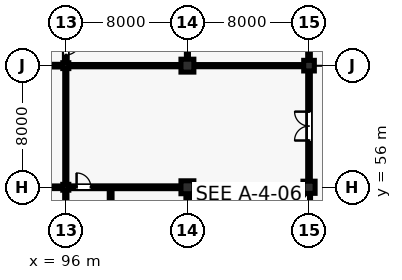
"""IFC4 building model, lengths in metres.
Left out: names, types, materials, properties, quantities, classifications, styles, units other than length and angle.
Written with IfcOpenShell. Run it as: python <this file> out.ifc"""

import sys

from ifc_helpers import new_model, si_unit, direction, frame, frame_2d, origin, origin_2d, place, context, subcontext, project, spatial, rectangle, i_section, extrude, element, fill, save


model = new_model("IFC4")
c1 = context("Model", 3, precision=1e-05, world=origin(), true_north=direction((0.0, 1.0)))
c2 = subcontext(c1, "Body", "Model", "MODEL_VIEW")
j1 = project(units=[si_unit("LENGTHUNIT", "METRE"), si_unit("PLANEANGLEUNIT", "RADIAN")], contexts=[c1])
p1 = place(None, origin())
s1 = spatial("IfcSite", under=j1, at=p1, CompositionType="ELEMENT")
p2 = place(p1, origin())
s2 = spatial("IfcBuilding", under=s1, at=p2, CompositionType="ELEMENT")
p3 = place(p2, origin())
s3 = spatial("IfcBuildingStorey", under=s2, at=p3, CompositionType="ELEMENT", Elevation=0.0)
for number, where, z_axis, x_axis in (
    (1, (96.0, 56.0, 0.0), (0.0, 0.0, 1.0), (1.0, 0.0, 0.0)),
    (2, (96.0, 64.0, 0.0), (0.0, 0.0, 1.0), (1.0, 0.0, 0.0)),
):
    element("IfcColumn", number, at=place(p3, frame(where, z_axis=z_axis, x_axis=x_axis)), inside=s3, PredefinedType="COLUMN", context=c2, shape_type="SweptSolid", body=[
        extrude(i_section(OverallWidth=0.398, OverallDepth=0.387, WebThickness=0.021, FlangeThickness=0.033, FilletRadius=0.015, at=origin_2d()), origin(), (0.0, 0.0, 1.0), 5.28),
    ])
for number, where, z_axis, x_axis in (
    (3, (104.0, 56.0, 0.0), (0.0, 0.0, 1.0), (1.0, 0.0, 0.0)),
    (4, (104.0, 64.0, 0.0), (0.0, 0.0, 1.0), (1.0, 0.0, 0.0)),
):
    element("IfcColumn", number, at=place(p3, frame(where, z_axis=z_axis, x_axis=x_axis)), inside=s3, PredefinedType="COLUMN", context=c2, shape_type="SweptSolid", body=[
        extrude(rectangle(XDim=0.85, YDim=0.85, at=origin_2d()), origin(), (0.0, 0.0, 1.0), 5.28),
    ])
p4 = place(p3, frame((112.0, 56.0, 0.0), z_axis=(0.0, 0.0, 1.0), x_axis=(1.0, 0.0, 0.0)))
e5 = element("IfcColumn", 5, at=p4, inside=s3, PredefinedType="COLUMN", context=c2, shape_type="SweptSolid", body=[
    extrude(rectangle(XDim=0.8, YDim=0.8, at=origin_2d()), origin(), (0.0, 0.0, 1.0), 5.28),
])
p5 = place(p3, frame((112.0, 64.0, 0.0), z_axis=(0.0, 0.0, 1.0), x_axis=(1.0, 0.0, 0.0)))
e6 = element("IfcColumn", 6, at=p5, inside=s3, PredefinedType="COLUMN", context=c2, shape_type="SweptSolid", body=[
    extrude(rectangle(XDim=0.7, YDim=0.7, at=origin_2d()), origin(), (0.0, 0.0, 1.0), 5.28),
])
p6 = place(p3, frame((104.05, 48.315, 0.0), z_axis=(0.0, 0.0, 1.0), x_axis=(0.0, 1.0, 0.0)))
e7 = element("IfcWall", 7, at=p6, inside=s3, PredefinedType="SHEAR", context=c2, shape_type="SweptSolid", body=[
    extrude(rectangle(XDim=7.37, YDim=0.3, at=frame_2d((3.685, 0.0))), origin(), (0.0, 0.0, 1.0), 5.035),
])
p7 = place(p3, frame((104.315, 55.95, 0.0), z_axis=(0.0, 0.0, 1.0), x_axis=(1.0, 0.0, 0.0)))
e8 = element("IfcWall", 8, at=p7, inside=s3, PredefinedType="SHEAR", context=c2, shape_type="SweptSolid", body=[
    extrude(rectangle(XDim=7.395, YDim=0.3, at=frame_2d((3.698, 0.0))), origin(), (0.0, 0.0, 1.0), 5.035),
])
p8 = place(p3, frame((111.95, 48.29, 0.0), z_axis=(0.0, 0.0, 1.0), x_axis=(0.0, 1.0, 0.0)))
e9 = element("IfcWall", 9, at=p8, inside=s3, PredefinedType="SHEAR", context=c2, shape_type="SweptSolid", body=[
    extrude(rectangle(XDim=7.42, YDim=0.3, at=frame_2d((3.71, 0.0))), origin(), (0.0, 0.0, 1.0), 5.035),
])
p9 = place(p3, frame((108.0, 48.05, 0.0), z_axis=(0.0, 0.0, 1.0), x_axis=(0.0, 1.0, 0.0)))
e10 = element("IfcWall", 10, at=p9, inside=s3, PredefinedType="SHEAR", context=c2, shape_type="SweptSolid", body=[
    extrude(rectangle(XDim=7.9, YDim=0.3, at=frame_2d((3.95, 0.0))), origin(), (0.0, 0.0, 1.0), 5.035),
])
p10 = place(p9, frame((0.55, 0.0, 0.0)))
e11 = element("IfcOpeningElement", 11, at=p10, cuts=e10, PredefinedType="OPENING", context=c2, shape_type="SweptSolid", body=[
    extrude(rectangle(XDim=1.1, YDim=2.15, at=frame_2d((0.55, 1.075))), frame((0.0, 0.16, 0.0), z_axis=(0.0, -1.0, 0.0), x_axis=(1.0, 0.0, 0.0)), (0.0, 0.0, 1.0), 0.32),
])
p11 = place(p3, frame((109.98, 53.05, 0.0), z_axis=(0.0, 0.0, 1.0), x_axis=(0.0, 1.0, 0.0)))
e12 = element("IfcWall", 12, at=p11, inside=s3, PredefinedType="SHEAR", context=c2, shape_type="SweptSolid", body=[
    extrude(rectangle(XDim=2.9, YDim=0.3, at=frame_2d((1.45, 0.0))), origin(), (0.0, 0.0, 1.0), 5.035),
])
p12 = place(p3, frame((96.0, 50.95, 0.0), z_axis=(0.0, 0.0, 1.0), x_axis=(0.0, 1.0, 0.0)))
e13 = element("IfcWall", 13, at=p12, inside=s3, PredefinedType="PARTITIONING", context=c2, shape_type="SweptSolid", body=[
    extrude(rectangle(XDim=4.846, YDim=0.15, at=frame_2d((2.423, 0.0))), origin(), (0.0, 0.0, 1.0), 4.404),
])
p13 = place(p3, frame((98.95, 50.9, 0.0), z_axis=(0.0, 0.0, 1.0), x_axis=(0.0, 1.0, 0.0)))
e14 = element("IfcWall", 14, at=p13, inside=s3, PredefinedType="PARTITIONING", context=c2, shape_type="SweptSolid", body=[
    extrude(rectangle(XDim=5.08, YDim=0.185, at=frame_2d((2.54, 0.0))), origin(), (0.0, 0.0, 1.0), 4.404),
])
p14 = place(p3, frame((88.0, 56.0, 0.0), z_axis=(0.0, 0.0, 1.0), x_axis=(1.0, 0.0, 0.0)))
e15 = element("IfcWall", 15, at=p14, inside=s3, PredefinedType="PARTITIONING", context=c2, shape_type="SweptSolid", body=[
    extrude(rectangle(XDim=7.811, YDim=0.175, at=frame_2d((3.906, 0.0))), origin(), (0.0, 0.0, 1.0), 4.169),
])
p15 = place(p14, frame((0.52, 0.0, 0.0)))
e16 = element("IfcOpeningElement", 16, at=p15, cuts=e15, PredefinedType="OPENING", context=c2, shape_type="SweptSolid", body=[
    extrude(rectangle(XDim=0.94, YDim=2.12, at=frame_2d((0.47, 1.06))), frame((0.0, 0.097, 0.0), z_axis=(0.0, -1.0, 0.0), x_axis=(1.0, 0.0, 0.0)), (0.0, 0.0, 1.0), 0.195),
])
p16 = place(p3, frame((96.0, 56.184, 0.0), z_axis=(0.0, 0.0, 1.0), x_axis=(0.0, 1.0, 0.0)))
e17 = element("IfcWall", 17, at=p16, inside=s3, PredefinedType="PARTITIONING", context=c2, shape_type="SweptSolid", body=[
    extrude(rectangle(XDim=7.633, YDim=0.142, at=frame_2d((3.816, 0.0))), origin(), (0.0, 0.0, 1.0), 4.471),
])
p17 = place(p3, frame((88.0, 64.0, 0.0), z_axis=(0.0, 0.0, 1.0), x_axis=(1.0, 0.0, 0.0)))
e18 = element("IfcWall", 18, at=p17, inside=s3, PredefinedType="PARTITIONING", context=c2, shape_type="SweptSolid", body=[
    extrude(rectangle(XDim=7.811, YDim=0.175, at=frame_2d((3.906, 0.0))), origin(), (0.0, 0.0, 1.0), 4.25),
])
p18 = place(p17, frame((2.956, 0.0, 0.0)))
e19 = element("IfcOpeningElement", 19, at=p18, cuts=e18, PredefinedType="OPENING", context=c2, shape_type="SweptSolid", body=[
    extrude(rectangle(XDim=1.9, YDim=2.38, at=frame_2d((0.95, 1.19))), frame((0.0, 0.097, 0.0), z_axis=(0.0, -1.0, 0.0), x_axis=(1.0, 0.0, 0.0)), (0.0, 0.0, 1.0), 0.195),
])
p19 = place(p3, frame((96.0, 64.184, 0.0), z_axis=(0.0, 0.0, 1.0), x_axis=(0.0, 1.0, 0.0)))
e20 = element("IfcWall", 20, at=p19, inside=s3, PredefinedType="PARTITIONING", context=c2, shape_type="SweptSolid", body=[
    extrude(rectangle(XDim=7.633, YDim=0.185, at=frame_2d((3.816, 0.0))), origin(), (0.0, 0.0, 1.0), 4.403),
])
p20 = place(p19, frame((0.52, 0.0, 0.0)))
e21 = element("IfcOpeningElement", 21, at=p20, cuts=e20, PredefinedType="OPENING", context=c2, shape_type="SweptSolid", body=[
    extrude(rectangle(XDim=0.94, YDim=2.12, at=frame_2d((0.47, 1.06))), frame((0.0, 0.103, 0.0), z_axis=(0.0, -1.0, 0.0), x_axis=(1.0, 0.0, 0.0)), (0.0, 0.0, 1.0), 0.205),
])
p21 = place(p3, frame((96.189, 56.0, 0.0), z_axis=(0.0, 0.0, 1.0), x_axis=(1.0, 0.0, 0.0)))
e22 = element("IfcWall", 22, at=p21, inside=s3, PredefinedType="PARTITIONING", context=c2, shape_type="SweptSolid", body=[
    extrude(rectangle(XDim=7.396, YDim=0.185, at=frame_2d((3.698, 0.0))), origin(), (0.0, 0.0, 1.0), 4.404),
])
p22 = place(p21, frame((0.52, 0.0, 0.0)))
e23 = element("IfcOpeningElement", 23, at=p22, cuts=e22, PredefinedType="OPENING", context=c2, shape_type="SweptSolid", body=[
    extrude(rectangle(XDim=0.94, YDim=2.12, at=frame_2d((0.47, 1.06))), frame((0.0, 0.103, 0.0), z_axis=(0.0, -1.0, 0.0), x_axis=(1.0, 0.0, 0.0)), (0.0, 0.0, 1.0), 0.205),
])
p23 = place(p3, frame((96.189, 64.0, 0.0), z_axis=(0.0, 0.0, 1.0), x_axis=(1.0, 0.0, 0.0)))
e24 = element("IfcWall", 24, at=p23, inside=s3, PredefinedType="PARTITIONING", context=c2, shape_type="SweptSolid", body=[
    extrude(rectangle(XDim=7.396, YDim=0.15, at=frame_2d((3.698, 0.0))), origin(), (0.0, 0.0, 1.0), 4.327),
])
p24 = place(p3, frame((104.0, 64.415, 0.0), z_axis=(0.0, 0.0, 1.0), x_axis=(0.0, 1.0, 0.0)))
e25 = element("IfcWall", 25, at=p24, inside=s3, PredefinedType="PARTITIONING", context=c2, shape_type="SweptSolid", body=[
    extrude(rectangle(XDim=7.17, YDim=0.135, at=frame_2d((3.585, 0.0))), origin(), (0.0, 0.0, 1.0), 4.412),
])
p25 = place(p3, frame((112.0, 56.39, 0.0), z_axis=(0.0, 0.0, 1.0), x_axis=(0.0, 1.0, 0.0)))
e26 = element("IfcWall", 26, at=p25, inside=s3, PredefinedType="PARTITIONING", context=c2, shape_type="SweptSolid", body=[
    extrude(rectangle(XDim=7.27, YDim=0.175, at=frame_2d((3.635, 0.0))), origin(), (0.0, 0.0, 1.0), 4.412),
])
p26 = place(p25, frame((2.685, 0.0, 0.0)))
e27 = element("IfcOpeningElement", 27, at=p26, cuts=e26, PredefinedType="OPENING", context=c2, shape_type="SweptSolid", body=[
    extrude(rectangle(XDim=1.9, YDim=2.38, at=frame_2d((0.95, 1.19))), frame((0.0, 0.097, 0.0), z_axis=(0.0, -1.0, 0.0), x_axis=(1.0, 0.0, 0.0)), (0.0, 0.0, 1.0), 0.195),
])
p27 = place(p3, frame((104.415, 64.0, 0.0), z_axis=(0.0, 0.0, 1.0), x_axis=(1.0, 0.0, 0.0)))
e28 = element("IfcWall", 28, at=p27, inside=s3, PredefinedType="PARTITIONING", context=c2, shape_type="SweptSolid", body=[
    extrude(rectangle(XDim=7.245, YDim=0.142, at=frame_2d((3.623, 0.0))), origin(), (0.0, 0.0, 1.0), 4.403),
])
p28 = place(p3, frame((112.0, 64.34, 0.0), z_axis=(0.0, 0.0, 1.0), x_axis=(0.0, 1.0, 0.0)))
e29 = element("IfcWall", 29, at=p28, inside=s3, PredefinedType="PARTITIONING", context=c2, shape_type="SweptSolid", body=[
    extrude(rectangle(XDim=7.32, YDim=0.175, at=frame_2d((3.66, 0.0))), origin(), (0.0, 0.0, 1.0), 4.404),
])
p29 = place(p28, frame((3.18, 0.0, 0.0)))
e30 = element("IfcOpeningElement", 30, at=p29, cuts=e29, PredefinedType="OPENING", context=c2, shape_type="SweptSolid", body=[
    extrude(rectangle(XDim=0.96, YDim=2.14, at=frame_2d((0.48, 1.07))), frame((0.0, 0.097, 0.0), z_axis=(0.0, -1.0, 0.0), x_axis=(1.0, 0.0, 0.0)), (0.0, 0.0, 1.0), 0.195),
])
p30 = place(p20, frame((0.94, 0.0, 0.0), z_axis=(0.0, 0.0, 1.0), x_axis=(-1.0, 0.0, 0.0)))
e31 = element("IfcDoor", 31, at=p30, inside=s3, OperationType="SINGLE_SWING_RIGHT", PredefinedType="DOOR", context=c2, shape_type="SweptSolid", body=[
    extrude(rectangle(XDim=0.94, YDim=2.12, at=frame_2d((0.47, 1.06))), frame((0.0, 0.025, 0.0), z_axis=(0.0, -1.0, 0.0), x_axis=(1.0, 0.0, 0.0)), (0.0, 0.0, 1.0), 0.05),
])
fill(e21, e31)
p31 = place(p22, origin())
e32 = element("IfcDoor", 32, at=p31, inside=s3, OperationType="SINGLE_SWING_LEFT", PredefinedType="DOOR", context=c2, shape_type="SweptSolid", body=[
    extrude(rectangle(XDim=0.94, YDim=2.12, at=frame_2d((0.47, 1.06))), frame((0.0, 0.025, 0.0), z_axis=(0.0, -1.0, 0.0), x_axis=(1.0, 0.0, 0.0)), (0.0, 0.0, 1.0), 0.05),
])
fill(e23, e32)
p32 = place(p26, origin())
e33 = element("IfcDoor", 33, at=p32, inside=s3, OperationType="DOUBLE_DOOR_SINGLE_SWING", PredefinedType="DOOR", context=c2, shape_type="SweptSolid", body=[
    extrude(rectangle(XDim=1.9, YDim=2.38, at=frame_2d((0.95, 1.19))), frame((0.0, 0.025, 0.0), z_axis=(0.0, -1.0, 0.0), x_axis=(1.0, 0.0, 0.0)), (0.0, 0.0, 1.0), 0.05),
])
fill(e27, e33)
save(model, sys.argv[1])
